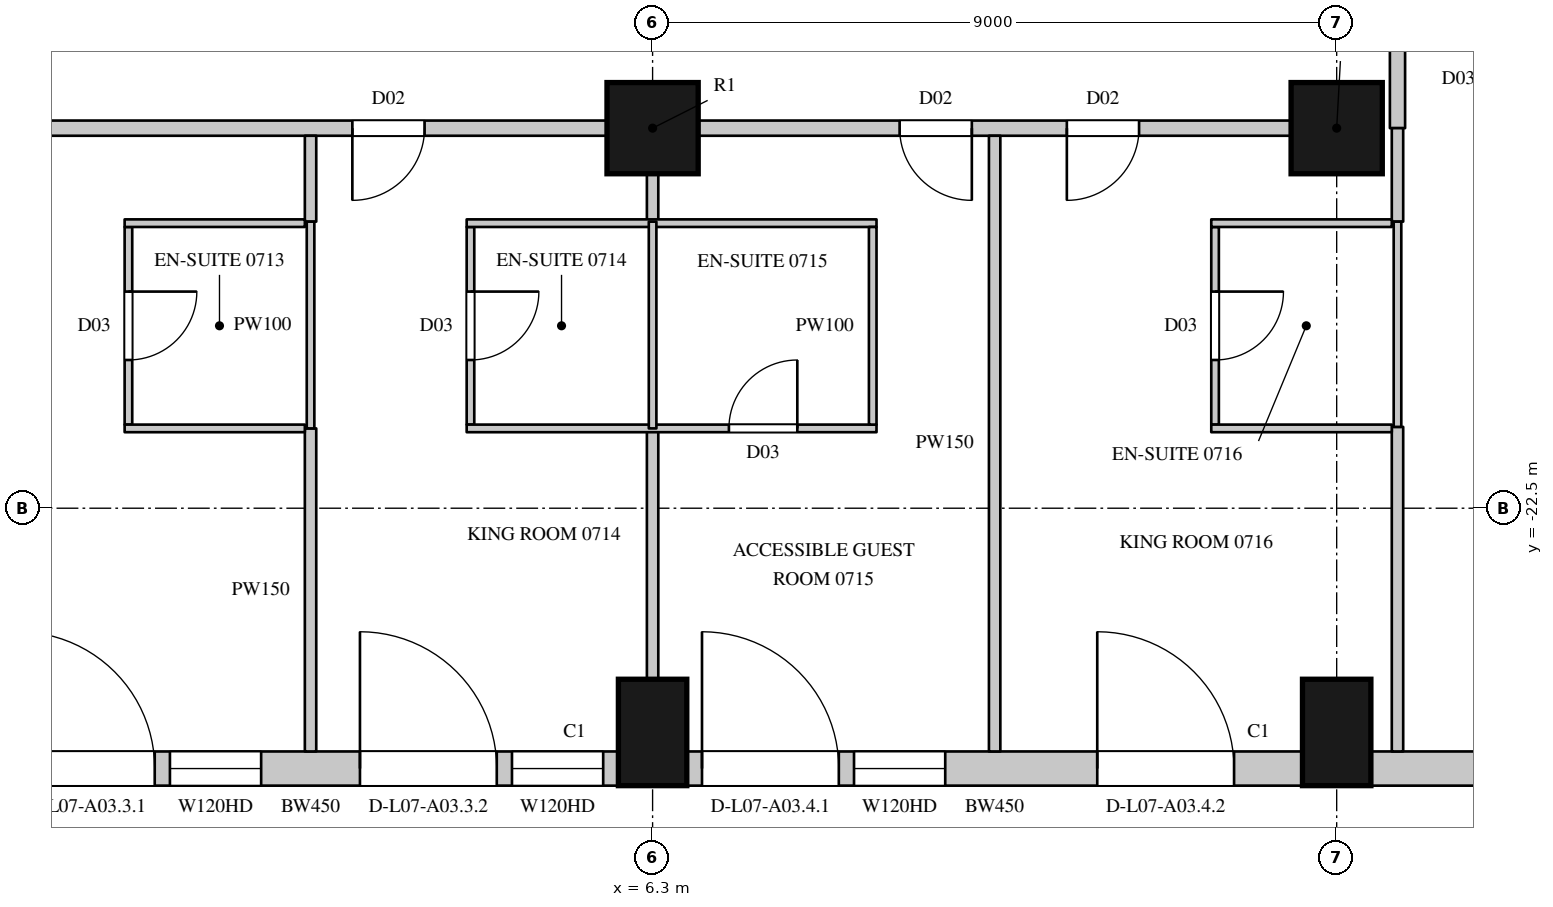
"""IFC4 building model, lengths in metres.
Left out: names, types, materials, properties, quantities, classifications, styles, units other than length and angle.
Written with IfcOpenShell. Run it as: python <this file> out.ifc"""

import sys

from ifc_helpers import new_model, si_unit, direction, frame, frame_2d, origin, origin_2d, place, context, subcontext, project, spatial, rectangle, circle, extrude, element, fill, save


model = new_model("IFC4")
c1 = context("Model", 3, precision=1e-05, world=origin(), true_north=direction((0.0, 1.0)))
c2 = subcontext(c1, "Body", "Model", "MODEL_VIEW")
j1 = project(units=[si_unit("LENGTHUNIT", "METRE"), si_unit("PLANEANGLEUNIT", "RADIAN")], contexts=[c1])
p1 = place(None, origin())
s1 = spatial("IfcSite", under=j1, at=p1, CompositionType="ELEMENT")
p2 = place(p1, origin())
s2 = spatial("IfcBuilding", under=s1, at=p2, CompositionType="ELEMENT")
p3 = place(p2, frame((0.0, 0.0, 55.5)))
s3 = spatial("IfcBuildingStorey", under=s2, at=p3, CompositionType="ELEMENT", Elevation=55.5)
for number, where, z_axis, x_axis in (
    (1, (6.3, -25.45, 0.0), (0.0, 0.0, 1.0), (1.0, 0.0, 0.0)),
    (2, (15.3, -25.45, 0.0), (0.0, 0.0, 1.0), (1.0, 0.0, 0.0)),
):
    element("IfcColumn", number, at=place(p3, frame(where, z_axis=z_axis, x_axis=x_axis)), inside=s3, PredefinedType="COLUMN", context=c2, shape_type="SweptSolid", body=[
        extrude(rectangle(XDim=0.9, YDim=1.4, at=origin_2d()), origin(), (0.0, 0.0, 1.0), 3.6),
    ])
for number, where, z_axis, x_axis in (
    (3, (6.3, -17.5, 0.0), (0.0, 0.0, 1.0), (1.0, 0.0, 0.0)),
    (4, (15.3, -17.5, 0.0), (0.0, 0.0, 1.0), (1.0, 0.0, 0.0)),
):
    element("IfcColumn", number, at=place(p3, frame(where, z_axis=z_axis, x_axis=x_axis)), inside=s3, PredefinedType="COLUMN", context=c2, shape_type="SweptSolid", body=[
        extrude(circle(Radius=0.6, at=origin_2d()), origin(), (0.0, 0.0, 1.0), 3.6),
    ])
p4 = place(p3, frame((-2.25, -25.925, 0.0), z_axis=(0.0, 0.0, 1.0), x_axis=(1.0, 0.0, 0.0)))
e5 = element("IfcWall", 5, at=p4, inside=s3, PredefinedType="SOLIDWALL", context=c2, shape_type="SweptSolid", body=[
    extrude(rectangle(XDim=8.1, YDim=0.45, at=frame_2d((4.05, 0.0))), origin(), (0.0, 0.0, 1.0), 3.3),
])
p5 = place(p4, frame((0.2, 0.0, 0.0)))
e6 = element("IfcOpeningElement", 6, at=p5, cuts=e5, PredefinedType="OPENING", context=c2, shape_type="SweptSolid", body=[
    extrude(rectangle(XDim=1.8, YDim=2.4, at=frame_2d((0.9, 1.2))), frame((0.0, 0.235, 0.0), z_axis=(0.0, -1.0, 0.0), x_axis=(1.0, 0.0, 0.0)), (0.0, 0.0, 1.0), 0.47),
])
p6 = place(p4, frame((2.2, 0.0, 1.05)))
e7 = element("IfcOpeningElement", 7, at=p6, cuts=e5, PredefinedType="OPENING", context=c2, shape_type="SweptSolid", body=[
    extrude(rectangle(XDim=1.2, YDim=2.0, at=frame_2d((0.6, 1.0))), frame((0.0, 0.235, 0.0), z_axis=(0.0, -1.0, 0.0), x_axis=(1.0, 0.0, 0.0)), (0.0, 0.0, 1.0), 0.47),
])
p7 = place(p4, frame((4.7, 0.0, 0.0)))
e8 = element("IfcOpeningElement", 8, at=p7, cuts=e5, PredefinedType="OPENING", context=c2, shape_type="SweptSolid", body=[
    extrude(rectangle(XDim=1.8, YDim=2.4, at=frame_2d((0.9, 1.2))), frame((0.0, 0.235, 0.0), z_axis=(0.0, -1.0, 0.0), x_axis=(1.0, 0.0, 0.0)), (0.0, 0.0, 1.0), 0.47),
])
p8 = place(p4, frame((6.7, 0.0, 1.05)))
e9 = element("IfcOpeningElement", 9, at=p8, cuts=e5, PredefinedType="OPENING", context=c2, shape_type="SweptSolid", body=[
    extrude(rectangle(XDim=1.2, YDim=2.0, at=frame_2d((0.6, 1.0))), frame((0.0, 0.235, 0.0), z_axis=(0.0, -1.0, 0.0), x_axis=(1.0, 0.0, 0.0)), (0.0, 0.0, 1.0), 0.47),
])
p9 = place(p3, frame((6.75, -25.925, 0.0), z_axis=(0.0, 0.0, 1.0), x_axis=(1.0, 0.0, 0.0)))
e10 = element("IfcWall", 10, at=p9, inside=s3, PredefinedType="SOLIDWALL", context=c2, shape_type="SweptSolid", body=[
    extrude(rectangle(XDim=8.1, YDim=0.45, at=frame_2d((4.05, 0.0))), origin(), (0.0, 0.0, 1.0), 3.3),
])
p10 = place(p9, frame((0.2, 0.0, 0.0)))
e11 = element("IfcOpeningElement", 11, at=p10, cuts=e10, PredefinedType="OPENING", context=c2, shape_type="SweptSolid", body=[
    extrude(rectangle(XDim=1.8, YDim=2.4, at=frame_2d((0.9, 1.2))), frame((0.0, 0.235, 0.0), z_axis=(0.0, -1.0, 0.0), x_axis=(1.0, 0.0, 0.0)), (0.0, 0.0, 1.0), 0.47),
])
p11 = place(p9, frame((2.2, 0.0, 1.05)))
e12 = element("IfcOpeningElement", 12, at=p11, cuts=e10, PredefinedType="OPENING", context=c2, shape_type="SweptSolid", body=[
    extrude(rectangle(XDim=1.2, YDim=2.0, at=frame_2d((0.6, 1.0))), frame((0.0, 0.235, 0.0), z_axis=(0.0, -1.0, 0.0), x_axis=(1.0, 0.0, 0.0)), (0.0, 0.0, 1.0), 0.47),
])
p12 = place(p9, frame((5.4, 0.0, 0.0)))
e13 = element("IfcOpeningElement", 13, at=p12, cuts=e10, PredefinedType="OPENING", context=c2, shape_type="SweptSolid", body=[
    extrude(rectangle(XDim=1.8, YDim=2.4, at=frame_2d((0.9, 1.2))), frame((0.0, 0.235, 0.0), z_axis=(0.0, -1.0, 0.0), x_axis=(1.0, 0.0, 0.0)), (0.0, 0.0, 1.0), 0.47),
])
p13 = place(p3, frame((15.75, -25.925, 0.0), z_axis=(0.0, 0.0, 1.0), x_axis=(1.0, 0.0, 0.0)))
e14 = element("IfcWall", 14, at=p13, inside=s3, PredefinedType="SOLIDWALL", context=c2, shape_type="SweptSolid", body=[
    extrude(rectangle(XDim=2.914, YDim=0.45, at=frame_2d((1.457, 0.0))), origin(), (0.0, 0.0, 1.0), 3.3),
])
p14 = place(p3, frame((-2.1, -17.5, 0.0), z_axis=(0.0, 0.0, 1.0), x_axis=(1.0, 0.0, 0.0)))
e15 = element("IfcWall", 15, at=p14, inside=s3, PredefinedType="PARTITIONING", context=c2, shape_type="SweptSolid", body=[
    extrude(rectangle(XDim=7.8, YDim=0.2, at=frame_2d((3.9, 0.0))), origin(), (0.0, 0.0, 1.0), 2.75),
])
p15 = place(p14, frame((4.45, 0.0, 0.0)))
e16 = element("IfcOpeningElement", 16, at=p15, cuts=e15, PredefinedType="OPENING", context=c2, shape_type="SweptSolid", body=[
    extrude(rectangle(XDim=0.95, YDim=2.2, at=frame_2d((0.475, 1.1))), frame((0.0, 0.11, 0.0), z_axis=(0.0, -1.0, 0.0), x_axis=(1.0, 0.0, 0.0)), (0.0, 0.0, 1.0), 0.22),
])
p16 = place(p3, frame((6.9, -17.5, 0.0), z_axis=(0.0, 0.0, 1.0), x_axis=(1.0, 0.0, 0.0)))
e17 = element("IfcWall", 17, at=p16, inside=s3, PredefinedType="PARTITIONING", context=c2, shape_type="SweptSolid", body=[
    extrude(rectangle(XDim=7.8, YDim=0.2, at=frame_2d((3.9, 0.0))), origin(), (0.0, 0.0, 1.0), 2.75),
])
p17 = place(p16, frame((2.65, 0.0, 0.0)))
e18 = element("IfcOpeningElement", 18, at=p17, cuts=e17, PredefinedType="OPENING", context=c2, shape_type="SweptSolid", body=[
    extrude(rectangle(XDim=0.95, YDim=2.2, at=frame_2d((0.475, 1.1))), frame((0.0, 0.11, 0.0), z_axis=(0.0, -1.0, 0.0), x_axis=(1.0, 0.0, 0.0)), (0.0, 0.0, 1.0), 0.22),
])
p18 = place(p16, frame((4.85, 0.0, 0.0)))
e19 = element("IfcOpeningElement", 19, at=p18, cuts=e17, PredefinedType="OPENING", context=c2, shape_type="SweptSolid", body=[
    extrude(rectangle(XDim=0.95, YDim=2.2, at=frame_2d((0.475, 1.1))), frame((0.0, 0.11, 0.0), z_axis=(0.0, -1.0, 0.0), x_axis=(1.0, 0.0, 0.0)), (0.0, 0.0, 1.0), 0.22),
])
p19 = place(p3, frame((16.1, -17.5, 0.0), z_axis=(0.0, 0.0, 1.0), x_axis=(0.0, 1.0, 0.0)))
e20 = element("IfcWall", 20, at=p19, inside=s3, PredefinedType="PARTITIONING", context=c2, shape_type="SweptSolid", body=[
    extrude(rectangle(XDim=12.75, YDim=0.2, at=frame_2d((6.375, 0.0))), origin(), (0.0, 0.0, 1.0), 3.3),
])
p20 = place(p19, frame((2.75, 0.0, 0.0)))
e21 = element("IfcOpeningElement", 21, at=p20, cuts=e20, PredefinedType="OPENING", context=c2, shape_type="SweptSolid", body=[
    extrude(rectangle(XDim=0.95, YDim=2.2, at=frame_2d((0.475, 1.1))), frame((0.0, 0.11, 0.0), z_axis=(0.0, -1.0, 0.0), x_axis=(1.0, 0.0, 0.0)), (0.0, 0.0, 1.0), 0.22),
])
p21 = place(p19, frame((6.95, 0.0, 0.0)))
e22 = element("IfcOpeningElement", 22, at=p21, cuts=e20, PredefinedType="OPENING", context=c2, shape_type="SweptSolid", body=[
    extrude(rectangle(XDim=0.95, YDim=2.2, at=frame_2d((0.475, 1.1))), frame((0.0, 0.11, 0.0), z_axis=(0.0, -1.0, 0.0), x_axis=(1.0, 0.0, 0.0)), (0.0, 0.0, 1.0), 0.22),
])
p22 = place(p19, frame((11.4, 0.0, 0.0)))
e23 = element("IfcOpeningElement", 23, at=p22, cuts=e20, PredefinedType="OPENING", context=c2, shape_type="SweptSolid", body=[
    extrude(rectangle(XDim=0.95, YDim=2.2, at=frame_2d((0.475, 1.1))), frame((0.0, 0.11, 0.0), z_axis=(0.0, -1.0, 0.0), x_axis=(1.0, 0.0, 0.0)), (0.0, 0.0, 1.0), 0.22),
])
p23 = place(p3, frame((1.8, -25.7, 0.0), z_axis=(0.0, 0.0, 1.0), x_axis=(0.0, 1.0, 0.0)))
e24 = element("IfcWall", 24, at=p23, inside=s3, PredefinedType="PARTITIONING", context=c2, shape_type="SweptSolid", body=[
    extrude(rectangle(XDim=4.25, YDim=0.15, at=frame_2d((2.125, 0.0))), origin(), (0.0, 0.0, 1.0), 2.65),
])
p24 = place(p3, frame((1.8, -18.73, 0.0), z_axis=(0.0, 0.0, 1.0), x_axis=(0.0, 1.0, 0.0)))
e25 = element("IfcWall", 25, at=p24, inside=s3, PredefinedType="PARTITIONING", context=c2, shape_type="SweptSolid", body=[
    extrude(rectangle(XDim=1.13, YDim=0.15, at=frame_2d((0.565, 0.0))), origin(), (0.0, 0.0, 1.0), 2.65),
])
p25 = place(p3, frame((6.3, -24.75, 0.0), z_axis=(0.0, 0.0, 1.0), x_axis=(0.0, 1.0, 0.0)))
e26 = element("IfcWall", 26, at=p25, inside=s3, PredefinedType="PARTITIONING", context=c2, shape_type="SweptSolid", body=[
    extrude(rectangle(XDim=3.3, YDim=0.15, at=frame_2d((1.65, 0.0))), origin(), (0.0, 0.0, 1.0), 2.75),
])
p26 = place(p3, frame((6.3, -18.73, 0.0), z_axis=(0.0, 0.0, 1.0), x_axis=(0.0, 1.0, 0.0)))
e27 = element("IfcWall", 27, at=p26, inside=s3, PredefinedType="PARTITIONING", context=c2, shape_type="SweptSolid", body=[
    extrude(rectangle(XDim=0.63, YDim=0.15, at=frame_2d((0.315, 0.0))), origin(), (0.0, 0.0, 1.0), 2.75),
])
p27 = place(p3, frame((10.8, -25.7, 0.0), z_axis=(0.0, 0.0, 1.0), x_axis=(0.0, 1.0, 0.0)))
e28 = element("IfcWall", 28, at=p27, inside=s3, PredefinedType="PARTITIONING", context=c2, shape_type="SweptSolid", body=[
    extrude(rectangle(XDim=8.1, YDim=0.15, at=frame_2d((4.05, 0.0))), origin(), (0.0, 0.0, 1.0), 2.65),
])
p28 = place(p3, frame((16.1, -25.7, 0.0), z_axis=(0.0, 0.0, 1.0), x_axis=(0.0, 1.0, 0.0)))
e29 = element("IfcWall", 29, at=p28, inside=s3, PredefinedType="PARTITIONING", context=c2, shape_type="SweptSolid", body=[
    extrude(rectangle(XDim=4.27, YDim=0.15, at=frame_2d((2.135, 0.0))), origin(), (0.0, 0.0, 1.0), 3.3),
])
p29 = place(p3, frame((16.1, -18.73, 0.0), z_axis=(0.0, 0.0, 1.0), x_axis=(0.0, 1.0, 0.0)))
e30 = element("IfcWall", 30, at=p29, inside=s3, PredefinedType="PARTITIONING", context=c2, shape_type="SweptSolid", body=[
    extrude(rectangle(XDim=1.23, YDim=0.15, at=frame_2d((0.615, 0.0))), origin(), (0.0, 0.0, 1.0), 3.3),
])
p30 = place(p3, frame((-0.596, -21.4, 0.0), z_axis=(0.0, 0.0, 1.0), x_axis=(0.0, 1.0, 0.0)))
e31 = element("IfcWall", 31, at=p30, inside=s3, PredefinedType="PARTITIONING", context=c2, shape_type="SweptSolid", body=[
    extrude(rectangle(XDim=2.6, YDim=0.1, at=frame_2d((1.3, 0.0))), origin(), (0.0, 0.0, 1.0), 3.3),
])
p31 = place(p30, frame((0.85, 0.0, 0.0)))
e32 = element("IfcOpeningElement", 32, at=p31, cuts=e31, PredefinedType="OPENING", context=c2, shape_type="SweptSolid", body=[
    extrude(rectangle(XDim=0.9, YDim=2.2, at=frame_2d((0.45, 1.1))), frame((0.0, 0.06, 0.0), z_axis=(0.0, -1.0, 0.0), x_axis=(1.0, 0.0, 0.0)), (0.0, 0.0, 1.0), 0.12),
])
for number, where, z_axis, x_axis in (
    (33, (-0.646, -21.45, 0.0), (0.0, 0.0, 1.0), (1.0, 0.0, 0.0)),
    (34, (-0.646, -18.75, 0.0), (0.0, 0.0, 1.0), (1.0, 0.0, 0.0)),
):
    element("IfcWall", number, at=place(p3, frame(where, z_axis=z_axis, x_axis=x_axis)), inside=s3, PredefinedType="PARTITIONING", context=c2, shape_type="SweptSolid", body=[
        extrude(rectangle(XDim=2.371, YDim=0.1, at=frame_2d((1.186, 0.0))), origin(), (0.0, 0.0, 1.0), 3.3),
    ])
p32 = place(p3, frame((1.8, -21.45, 0.0), z_axis=(0.0, 0.0, 1.0), x_axis=(0.0, 1.0, 0.0)))
e35 = element("IfcWall", 35, at=p32, inside=s3, PredefinedType="PARTITIONING", context=c2, shape_type="SweptSolid", body=[
    extrude(rectangle(XDim=2.72, YDim=0.1, at=frame_2d((1.36, 0.0))), origin(), (0.0, 0.0, 1.0), 2.65),
])
p33 = place(p3, frame((3.904, -21.4, 0.0), z_axis=(0.0, 0.0, 1.0), x_axis=(0.0, 1.0, 0.0)))
e36 = element("IfcWall", 36, at=p33, inside=s3, PredefinedType="PARTITIONING", context=c2, shape_type="SweptSolid", body=[
    extrude(rectangle(XDim=2.6, YDim=0.1, at=frame_2d((1.3, 0.0))), origin(), (0.0, 0.0, 1.0), 3.3),
])
p34 = place(p33, frame((0.85, 0.0, 0.0)))
e37 = element("IfcOpeningElement", 37, at=p34, cuts=e36, PredefinedType="OPENING", context=c2, shape_type="SweptSolid", body=[
    extrude(rectangle(XDim=0.9, YDim=2.2, at=frame_2d((0.45, 1.1))), frame((0.0, 0.06, 0.0), z_axis=(0.0, -1.0, 0.0), x_axis=(1.0, 0.0, 0.0)), (0.0, 0.0, 1.0), 0.12),
])
p35 = place(p3, frame((3.854, -21.45, 0.0), z_axis=(0.0, 0.0, 1.0), x_axis=(1.0, 0.0, 0.0)))
e38 = element("IfcWall", 38, at=p35, inside=s3, PredefinedType="PARTITIONING", context=c2, shape_type="SweptSolid", body=[
    extrude(rectangle(XDim=5.392, YDim=0.1, at=frame_2d((2.696, 0.0))), origin(), (0.0, 0.0, 1.0), 3.3),
])
p36 = place(p35, frame((3.45, 0.0, 0.0)))
e39 = element("IfcOpeningElement", 39, at=p36, cuts=e38, PredefinedType="OPENING", context=c2, shape_type="SweptSolid", body=[
    extrude(rectangle(XDim=0.9, YDim=2.2, at=frame_2d((0.45, 1.1))), frame((0.0, 0.06, 0.0), z_axis=(0.0, -1.0, 0.0), x_axis=(1.0, 0.0, 0.0)), (0.0, 0.0, 1.0), 0.12),
])
p37 = place(p3, frame((3.854, -18.75, 0.0), z_axis=(0.0, 0.0, 1.0), x_axis=(1.0, 0.0, 0.0)))
e40 = element("IfcWall", 40, at=p37, inside=s3, PredefinedType="PARTITIONING", context=c2, shape_type="SweptSolid", body=[
    extrude(rectangle(XDim=5.392, YDim=0.1, at=frame_2d((2.696, 0.0))), origin(), (0.0, 0.0, 1.0), 3.3),
])
p38 = place(p3, frame((6.3, -21.45, 0.0), z_axis=(0.0, 0.0, 1.0), x_axis=(0.0, 1.0, 0.0)))
e41 = element("IfcWall", 41, at=p38, inside=s3, PredefinedType="PARTITIONING", context=c2, shape_type="SweptSolid", body=[
    extrude(rectangle(XDim=2.72, YDim=0.1, at=frame_2d((1.36, 0.0))), origin(), (0.0, 0.0, 1.0), 2.75),
])
p39 = place(p3, frame((9.196, -21.4, 0.0), z_axis=(0.0, 0.0, 1.0), x_axis=(0.0, 1.0, 0.0)))
e42 = element("IfcWall", 42, at=p39, inside=s3, PredefinedType="PARTITIONING", context=c2, shape_type="SweptSolid", body=[
    extrude(rectangle(XDim=2.6, YDim=0.1, at=frame_2d((1.3, 0.0))), origin(), (0.0, 0.0, 1.0), 3.3),
])
p40 = place(p3, frame((13.7, -21.4, 0.0), z_axis=(0.0, 0.0, 1.0), x_axis=(0.0, 1.0, 0.0)))
e43 = element("IfcWall", 43, at=p40, inside=s3, PredefinedType="PARTITIONING", context=c2, shape_type="SweptSolid", body=[
    extrude(rectangle(XDim=2.6, YDim=0.1, at=frame_2d((1.3, 0.0))), origin(), (0.0, 0.0, 1.0), 3.3),
])
p41 = place(p40, frame((0.85, 0.0, 0.0)))
e44 = element("IfcOpeningElement", 44, at=p41, cuts=e43, PredefinedType="OPENING", context=c2, shape_type="SweptSolid", body=[
    extrude(rectangle(XDim=0.9, YDim=2.2, at=frame_2d((0.45, 1.1))), frame((0.0, 0.06, 0.0), z_axis=(0.0, -1.0, 0.0), x_axis=(1.0, 0.0, 0.0)), (0.0, 0.0, 1.0), 0.12),
])
for number, where, z_axis, x_axis in (
    (45, (13.65, -21.45, 0.0), (0.0, 0.0, 1.0), (1.0, 0.0, 0.0)),
    (46, (13.65, -18.75, 0.0), (0.0, 0.0, 1.0), (1.0, 0.0, 0.0)),
):
    element("IfcWall", number, at=place(p3, frame(where, z_axis=z_axis, x_axis=x_axis)), inside=s3, PredefinedType="PARTITIONING", context=c2, shape_type="SweptSolid", body=[
        extrude(rectangle(XDim=2.375, YDim=0.1, at=frame_2d((1.188, 0.0))), origin(), (0.0, 0.0, 1.0), 3.3),
    ])
p42 = place(p3, frame((16.1, -21.43, 0.0), z_axis=(0.0, 0.0, 1.0), x_axis=(0.0, 1.0, 0.0)))
e47 = element("IfcWall", 47, at=p42, inside=s3, PredefinedType="PARTITIONING", context=c2, shape_type="SweptSolid", body=[
    extrude(rectangle(XDim=2.7, YDim=0.1, at=frame_2d((1.35, 0.0))), origin(), (0.0, 0.0, 1.0), 3.3),
])
p43 = place(p5, origin())
e48 = element("IfcDoor", 48, at=p43, inside=s3, OperationType="SLIDING_TO_LEFT", PredefinedType="DOOR", context=c2, shape_type="SweptSolid", body=[
    extrude(rectangle(XDim=1.8, YDim=2.4, at=frame_2d((0.9, 1.2))), frame((0.0, 0.13, 0.0), z_axis=(0.0, -1.0, 0.0), x_axis=(1.0, 0.0, 0.0)), (0.0, 0.0, 1.0), 0.05),
])
fill(e6, e48)
p44 = place(p6, origin())
e49 = element("IfcWindow", 49, at=p44, inside=s3, PartitioningType="SINGLE_PANEL", PredefinedType="WINDOW", context=c2, shape_type="SweptSolid", body=[
    extrude(rectangle(XDim=1.2, YDim=2.0, at=frame_2d((0.6, 1.0))), frame((0.0, 0.135, 0.0), z_axis=(0.0, -1.0, 0.0), x_axis=(1.0, 0.0, 0.0)), (0.0, 0.0, 1.0), 0.06),
])
fill(e7, e49)
p45 = place(p7, origin())
e50 = element("IfcDoor", 50, at=p45, inside=s3, OperationType="SLIDING_TO_LEFT", PredefinedType="DOOR", context=c2, shape_type="SweptSolid", body=[
    extrude(rectangle(XDim=1.8, YDim=2.4, at=frame_2d((0.9, 1.2))), frame((0.0, 0.13, 0.0), z_axis=(0.0, -1.0, 0.0), x_axis=(1.0, 0.0, 0.0)), (0.0, 0.0, 1.0), 0.05),
])
fill(e8, e50)
p46 = place(p8, origin())
e51 = element("IfcWindow", 51, at=p46, inside=s3, PartitioningType="SINGLE_PANEL", PredefinedType="WINDOW", context=c2, shape_type="SweptSolid", body=[
    extrude(rectangle(XDim=1.2, YDim=2.0, at=frame_2d((0.6, 1.0))), frame((0.0, 0.135, 0.0), z_axis=(0.0, -1.0, 0.0), x_axis=(1.0, 0.0, 0.0)), (0.0, 0.0, 1.0), 0.06),
])
fill(e9, e51)
p47 = place(p10, origin())
e52 = element("IfcDoor", 52, at=p47, inside=s3, OperationType="SLIDING_TO_LEFT", PredefinedType="DOOR", context=c2, shape_type="SweptSolid", body=[
    extrude(rectangle(XDim=1.8, YDim=2.4, at=frame_2d((0.9, 1.2))), frame((0.0, 0.13, 0.0), z_axis=(0.0, -1.0, 0.0), x_axis=(1.0, 0.0, 0.0)), (0.0, 0.0, 1.0), 0.05),
])
fill(e11, e52)
p48 = place(p11, origin())
e53 = element("IfcWindow", 53, at=p48, inside=s3, PartitioningType="SINGLE_PANEL", PredefinedType="WINDOW", context=c2, shape_type="SweptSolid", body=[
    extrude(rectangle(XDim=1.2, YDim=2.0, at=frame_2d((0.6, 1.0))), frame((0.0, 0.135, 0.0), z_axis=(0.0, -1.0, 0.0), x_axis=(1.0, 0.0, 0.0)), (0.0, 0.0, 1.0), 0.06),
])
fill(e12, e53)
p49 = place(p12, origin())
e54 = element("IfcDoor", 54, at=p49, inside=s3, OperationType="SLIDING_TO_LEFT", PredefinedType="DOOR", context=c2, shape_type="SweptSolid", body=[
    extrude(rectangle(XDim=1.8, YDim=2.4, at=frame_2d((0.9, 1.2))), frame((0.0, 0.13, 0.0), z_axis=(0.0, -1.0, 0.0), x_axis=(1.0, 0.0, 0.0)), (0.0, 0.0, 1.0), 0.05),
])
fill(e13, e54)
p50 = place(p31, origin())
e55 = element("IfcDoor", 55, at=p50, inside=s3, OperationType="SINGLE_SWING_LEFT", PredefinedType="DOOR", context=c2, shape_type="SweptSolid", body=[
    extrude(rectangle(XDim=0.9, YDim=2.2, at=frame_2d((0.45, 1.1))), frame((0.0, 0.025, 0.0), z_axis=(0.0, -1.0, 0.0), x_axis=(1.0, 0.0, 0.0)), (0.0, 0.0, 1.0), 0.05),
])
fill(e32, e55)
p51 = place(p15, origin())
e56 = element("IfcDoor", 56, at=p51, inside=s3, OperationType="SINGLE_SWING_RIGHT", PredefinedType="DOOR", context=c2, shape_type="SweptSolid", body=[
    extrude(rectangle(XDim=0.95, YDim=2.2, at=frame_2d((0.475, 1.1))), frame((0.0, 0.025, 0.0), z_axis=(0.0, -1.0, 0.0), x_axis=(1.0, 0.0, 0.0)), (0.0, 0.0, 1.0), 0.05),
])
fill(e16, e56)
p52 = place(p34, origin())
e57 = element("IfcDoor", 57, at=p52, inside=s3, OperationType="SINGLE_SWING_LEFT", PredefinedType="DOOR", context=c2, shape_type="SweptSolid", body=[
    extrude(rectangle(XDim=0.9, YDim=2.2, at=frame_2d((0.45, 1.1))), frame((0.0, 0.025, 0.0), z_axis=(0.0, -1.0, 0.0), x_axis=(1.0, 0.0, 0.0)), (0.0, 0.0, 1.0), 0.05),
])
fill(e37, e57)
p53 = place(p17, origin())
e58 = element("IfcDoor", 58, at=p53, inside=s3, OperationType="SINGLE_SWING_LEFT", PredefinedType="DOOR", context=c2, shape_type="SweptSolid", body=[
    extrude(rectangle(XDim=0.95, YDim=2.2, at=frame_2d((0.475, 1.1))), frame((0.0, 0.025, 0.0), z_axis=(0.0, -1.0, 0.0), x_axis=(1.0, 0.0, 0.0)), (0.0, 0.0, 1.0), 0.05),
])
fill(e18, e58)
p54 = place(p36, origin())
e59 = element("IfcDoor", 59, at=p54, inside=s3, OperationType="SINGLE_SWING_RIGHT", PredefinedType="DOOR", context=c2, shape_type="SweptSolid", body=[
    extrude(rectangle(XDim=0.9, YDim=2.2, at=frame_2d((0.45, 1.1))), frame((0.0, 0.025, 0.0), z_axis=(0.0, -1.0, 0.0), x_axis=(1.0, 0.0, 0.0)), (0.0, 0.0, 1.0), 0.05),
])
fill(e39, e59)
p55 = place(p18, origin())
e60 = element("IfcDoor", 60, at=p55, inside=s3, OperationType="SINGLE_SWING_RIGHT", PredefinedType="DOOR", context=c2, shape_type="SweptSolid", body=[
    extrude(rectangle(XDim=0.95, YDim=2.2, at=frame_2d((0.475, 1.1))), frame((0.0, 0.025, 0.0), z_axis=(0.0, -1.0, 0.0), x_axis=(1.0, 0.0, 0.0)), (0.0, 0.0, 1.0), 0.05),
])
fill(e19, e60)
p56 = place(p41, origin())
e61 = element("IfcDoor", 61, at=p56, inside=s3, OperationType="SINGLE_SWING_LEFT", PredefinedType="DOOR", context=c2, shape_type="SweptSolid", body=[
    extrude(rectangle(XDim=0.9, YDim=2.2, at=frame_2d((0.45, 1.1))), frame((0.0, 0.025, 0.0), z_axis=(0.0, -1.0, 0.0), x_axis=(1.0, 0.0, 0.0)), (0.0, 0.0, 1.0), 0.05),
])
fill(e44, e61)
save(model, sys.argv[1])
